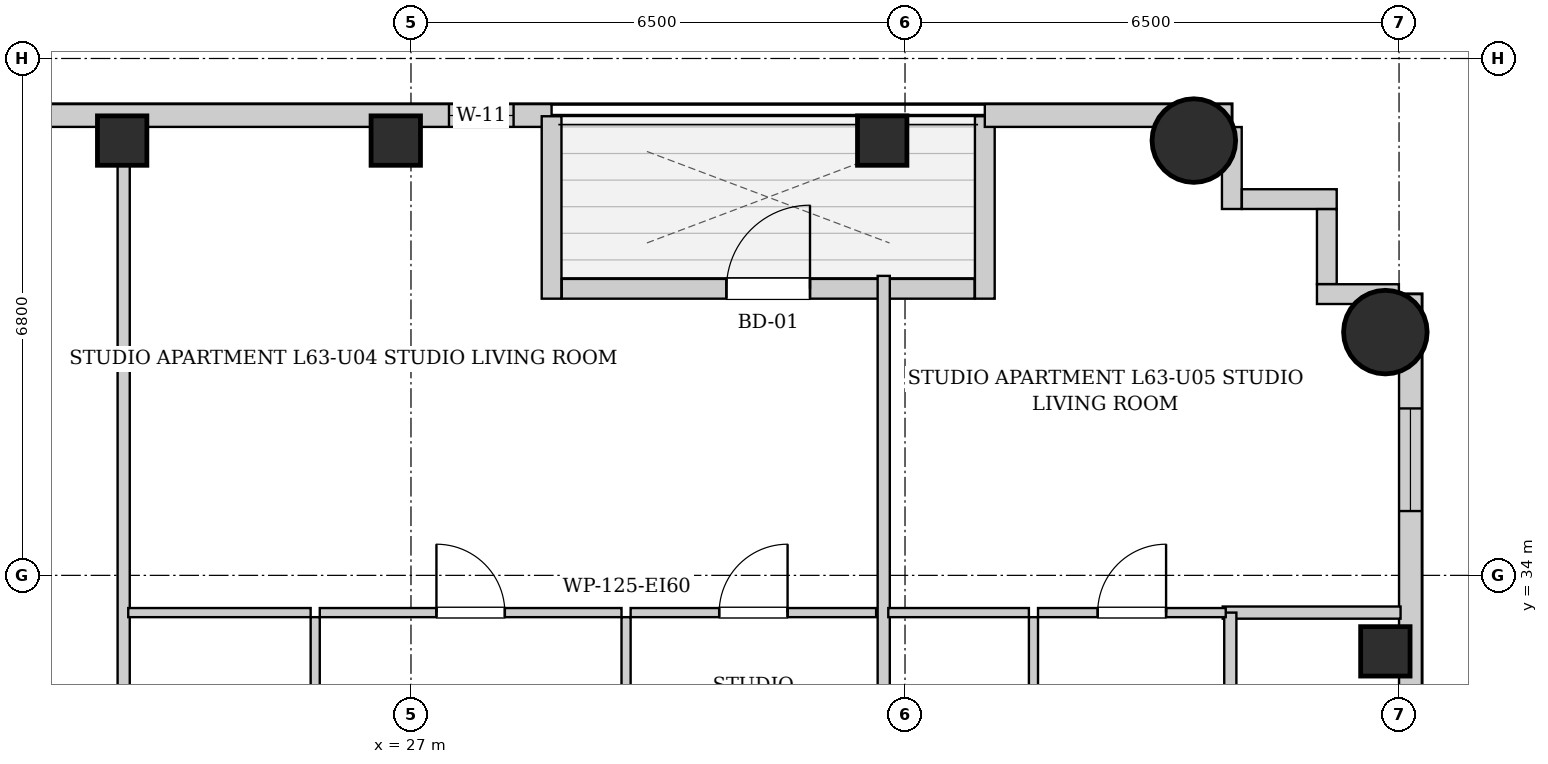
"""IFC4 building model, lengths in metres.
Left out: names, types, materials, properties, quantities, classifications, styles, units other than length and angle.
Written with IfcOpenShell. Run it as: python <this file> out.ifc"""

import sys

from ifc_helpers import new_model, si_unit, direction, frame, frame_2d, origin, origin_2d, place, context, subcontext, project, spatial, rectangle, circle, extrude, element, fill, save


model = new_model("IFC4")
c1 = context("Model", 3, precision=1e-05, world=origin(), true_north=direction((0.0, 1.0)))
c2 = subcontext(c1, "Body", "Model", "MODEL_VIEW")
j1 = project(units=[si_unit("LENGTHUNIT", "METRE"), si_unit("PLANEANGLEUNIT", "RADIAN")], contexts=[c1])
p1 = place(None, origin())
s1 = spatial("IfcSite", under=j1, at=p1, CompositionType="ELEMENT")
p2 = place(p1, origin())
s2 = spatial("IfcBuilding", under=s1, at=p2, CompositionType="ELEMENT")
p3 = place(p2, frame((0.0, 0.0, 217.3)))
s3 = spatial("IfcBuildingStorey", under=s2, at=p3, CompositionType="ELEMENT", Elevation=217.3)
for number, where, z_axis, x_axis in (
    (1, (23.2, 39.72, 0.0), (0.0, 0.0, 1.0), (1.0, 0.0, 0.0)),
    (2, (26.8, 39.72, 0.0), (0.0, 0.0, 1.0), (1.0, 0.0, 0.0)),
    (3, (33.2, 39.72, 0.0), (0.0, 0.0, 1.0), (1.0, 0.0, 0.0)),
):
    element("IfcColumn", number, at=place(p3, frame(where, z_axis=z_axis, x_axis=x_axis)), inside=s3, PredefinedType="COLUMN", context=c2, shape_type="SweptSolid", body=[
        extrude(rectangle(XDim=0.65, YDim=0.65, at=origin_2d()), origin(), (0.0, 0.0, 1.0), 3.4),
    ])
p4 = place(p3, frame((37.3, 39.72, 0.0), z_axis=(0.0, 0.0, 1.0), x_axis=(1.0, 0.0, 0.0)))
e4 = element("IfcColumn", 4, at=p4, inside=s3, PredefinedType="COLUMN", context=c2, shape_type="SweptSolid", body=[
    extrude(circle(Radius=0.55, at=origin_2d()), origin(), (0.0, 0.0, 1.0), 3.4),
])
p5 = place(p3, frame((39.82, 33.0, 0.0), z_axis=(0.0, 0.0, 1.0), x_axis=(1.0, 0.0, 0.0)))
e5 = element("IfcColumn", 5, at=p5, inside=s3, PredefinedType="COLUMN", context=c2, shape_type="SweptSolid", body=[
    extrude(rectangle(XDim=0.65, YDim=0.65, at=origin_2d()), origin(), (0.0, 0.0, 1.0), 3.4),
])
p6 = place(p3, frame((39.82, 37.2, 0.0), z_axis=(0.0, 0.0, 1.0), x_axis=(1.0, 0.0, 0.0)))
e6 = element("IfcColumn", 6, at=p6, inside=s3, PredefinedType="COLUMN", context=c2, shape_type="SweptSolid", body=[
    extrude(circle(Radius=0.55, at=origin_2d()), origin(), (0.0, 0.0, 1.0), 3.4),
])
p7 = place(p3, frame((19.7, 40.05, 0.0), z_axis=(0.0, 0.0, 1.0), x_axis=(1.0, 0.0, 0.0)))
e7 = element("IfcWall", 7, at=p7, inside=s3, PredefinedType="SOLIDWALL", context=c2, shape_type="SweptSolid", body=[
    extrude(rectangle(XDim=9.15, YDim=0.3, at=frame_2d((4.575, 0.0))), origin(), (0.0, 0.0, 1.0), 3.14),
])
p8 = place(p7, frame((7.8, 0.0, 0.55)))
e8 = element("IfcOpeningElement", 8, at=p8, cuts=e7, PredefinedType="OPENING", context=c2, shape_type="SweptSolid", body=[
    extrude(rectangle(XDim=0.85, YDim=1.2, at=frame_2d((0.425, 0.6))), frame((0.0, 0.16, 0.0), z_axis=(0.0, -1.0, 0.0), x_axis=(1.0, 0.0, 0.0)), (0.0, 0.0, 1.0), 0.32),
])
p9 = place(p3, frame((28.85, 40.04, 0.0), z_axis=(0.0, 0.0, 1.0), x_axis=(0.0, -1.0, 0.0)))
e9 = element("IfcWall", 9, at=p9, inside=s3, PredefinedType="SOLIDWALL", context=c2, shape_type="SweptSolid", body=[
    extrude(rectangle(XDim=2.4, YDim=0.26, at=frame_2d((1.2, 0.0))), origin(), (0.0, 0.0, 1.0), 3.14),
])
p10 = place(p3, frame((28.984, 37.77, 0.0), z_axis=(0.0, 0.0, 1.0), x_axis=(1.0, 0.0, 0.0)))
e10 = element("IfcWall", 10, at=p10, inside=s3, PredefinedType="SOLIDWALL", context=c2, shape_type="SweptSolid", body=[
    extrude(rectangle(XDim=5.432, YDim=0.26, at=frame_2d((2.716, 0.0))), origin(), (0.0, 0.0, 1.0), 3.14),
])
p11 = place(p10, frame((2.166, 0.0, 0.0)))
e11 = element("IfcOpeningElement", 11, at=p11, cuts=e10, PredefinedType="OPENING", context=c2, shape_type="SweptSolid", body=[
    extrude(rectangle(XDim=1.1, YDim=2.0, at=frame_2d((0.55, 1.0))), frame((0.0, 0.14, 0.0), z_axis=(0.0, -1.0, 0.0), x_axis=(1.0, 0.0, 0.0)), (0.0, 0.0, 1.0), 0.28),
])
p12 = place(p3, frame((34.55, 37.64, 0.0), z_axis=(0.0, 0.0, 1.0), x_axis=(0.0, 1.0, 0.0)))
e12 = element("IfcWall", 12, at=p12, inside=s3, PredefinedType="SOLIDWALL", context=c2, shape_type="SweptSolid", body=[
    extrude(rectangle(XDim=2.4, YDim=0.26, at=frame_2d((1.2, 0.0))), origin(), (0.0, 0.0, 1.0), 3.14),
])
p13 = place(p3, frame((34.55, 40.05, 0.0), z_axis=(0.0, 0.0, 1.0), x_axis=(1.0, 0.0, 0.0)))
e13 = element("IfcWall", 13, at=p13, inside=s3, PredefinedType="SOLIDWALL", context=c2, shape_type="SweptSolid", body=[
    extrude(rectangle(XDim=3.25, YDim=0.3, at=frame_2d((1.625, 0.0))), origin(), (0.0, 0.0, 1.0), 3.14),
])
p14 = place(p3, frame((40.15, 37.7, 0.0), z_axis=(0.0, 0.0, 1.0), x_axis=(0.0, -1.0, 0.0)))
e14 = element("IfcWall", 14, at=p14, inside=s3, PredefinedType="SOLIDWALL", context=c2, shape_type="SweptSolid", body=[
    extrude(rectangle(XDim=31.4, YDim=0.3, at=frame_2d((15.7, 0.0))), origin(), (0.0, 0.0, 1.0), 3.14),
])
p15 = place(p14, frame((28.546, 0.0, 0.55)))
e15 = element("IfcOpeningElement", 15, at=p15, cuts=e14, PredefinedType="OPENING", context=c2, shape_type="SweptSolid", body=[
    extrude(rectangle(XDim=1.35, YDim=1.2, at=frame_2d((0.675, 0.6))), frame((0.0, 0.16, 0.0), z_axis=(0.0, -1.0, 0.0), x_axis=(1.0, 0.0, 0.0)), (0.0, 0.0, 1.0), 0.32),
])
p16 = place(p14, frame((1.504, 0.0, 0.55)))
e16 = element("IfcOpeningElement", 16, at=p16, cuts=e14, PredefinedType="OPENING", context=c2, shape_type="SweptSolid", body=[
    extrude(rectangle(XDim=1.35, YDim=1.2, at=frame_2d((0.675, 0.6))), frame((0.0, 0.16, 0.0), z_axis=(0.0, -1.0, 0.0), x_axis=(1.0, 0.0, 0.0)), (0.0, 0.0, 1.0), 0.32),
])
p17 = place(p14, frame((18.2, 0.0, 0.55)))
e17 = element("IfcOpeningElement", 17, at=p17, cuts=e14, PredefinedType="OPENING", context=c2, shape_type="SweptSolid", body=[
    extrude(rectangle(XDim=1.35, YDim=1.2, at=frame_2d((0.675, 0.6))), frame((0.0, 0.16, 0.0), z_axis=(0.0, -1.0, 0.0), x_axis=(1.0, 0.0, 0.0)), (0.0, 0.0, 1.0), 0.32),
])
p18 = place(p14, frame((19.81, 0.0, 0.55)))
e18 = element("IfcOpeningElement", 18, at=p18, cuts=e14, PredefinedType="OPENING", context=c2, shape_type="SweptSolid", body=[
    extrude(rectangle(XDim=1.35, YDim=1.2, at=frame_2d((0.675, 0.6))), frame((0.0, 0.16, 0.0), z_axis=(0.0, -1.0, 0.0), x_axis=(1.0, 0.0, 0.0)), (0.0, 0.0, 1.0), 0.32),
])
p19 = place(p14, frame((11.043, 0.0, 0.55)))
e19 = element("IfcOpeningElement", 19, at=p19, cuts=e14, PredefinedType="OPENING", context=c2, shape_type="SweptSolid", body=[
    extrude(rectangle(XDim=1.35, YDim=1.2, at=frame_2d((0.675, 0.6))), frame((0.0, 0.16, 0.0), z_axis=(0.0, -1.0, 0.0), x_axis=(1.0, 0.0, 0.0)), (0.0, 0.0, 1.0), 0.32),
])
p20 = place(p14, frame((9.185, 0.0, 0.55)))
e20 = element("IfcOpeningElement", 20, at=p20, cuts=e14, PredefinedType="OPENING", context=c2, shape_type="SweptSolid", body=[
    extrude(rectangle(XDim=1.35, YDim=1.2, at=frame_2d((0.675, 0.6))), frame((0.0, 0.16, 0.0), z_axis=(0.0, -1.0, 0.0), x_axis=(1.0, 0.0, 0.0)), (0.0, 0.0, 1.0), 0.32),
])
p21 = place(p3, frame((37.8, 39.898, 0.0), z_axis=(0.0, 0.0, 1.0), x_axis=(0.0, -1.0, 0.0)))
e21 = element("IfcWall", 21, at=p21, inside=s3, PredefinedType="SOLIDWALL", context=c2, shape_type="SweptSolid", body=[
    extrude(rectangle(XDim=1.078, YDim=0.26, at=frame_2d((0.539, 0.0))), origin(), (0.0, 0.0, 1.0), 3.14),
])
p22 = place(p3, frame((37.932, 38.95, 0.0), z_axis=(0.0, 0.0, 1.0), x_axis=(1.0, 0.0, 0.0)))
e22 = element("IfcWall", 22, at=p22, inside=s3, PredefinedType="SOLIDWALL", context=c2, shape_type="SweptSolid", body=[
    extrude(rectangle(XDim=1.248, YDim=0.26, at=frame_2d((0.624, 0.0))), origin(), (0.0, 0.0, 1.0), 3.14),
])
p23 = place(p3, frame((39.05, 38.818, 0.0), z_axis=(0.0, 0.0, 1.0), x_axis=(0.0, -1.0, 0.0)))
e23 = element("IfcWall", 23, at=p23, inside=s3, PredefinedType="SOLIDWALL", context=c2, shape_type="SweptSolid", body=[
    extrude(rectangle(XDim=0.986, YDim=0.26, at=frame_2d((0.493, 0.0))), origin(), (0.0, 0.0, 1.0), 3.14),
])
p24 = place(p3, frame((38.92, 37.7, 0.0), z_axis=(0.0, 0.0, 1.0), x_axis=(1.0, 0.0, 0.0)))
e24 = element("IfcWall", 24, at=p24, inside=s3, PredefinedType="SOLIDWALL", context=c2, shape_type="SweptSolid", body=[
    extrude(rectangle(XDim=1.078, YDim=0.26, at=frame_2d((0.539, 0.0))), origin(), (0.0, 0.0, 1.0), 3.14),
])
p25 = place(p3, frame((23.22, 30.6, 0.0), z_axis=(0.0, 0.0, 1.0), x_axis=(0.0, 1.0, 0.0)))
e25 = element("IfcWall", 25, at=p25, inside=s3, PredefinedType="PARTITIONING", context=c2, shape_type="SweptSolid", body=[
    extrude(rectangle(XDim=9.32, YDim=0.16, at=frame_2d((4.66, 0.0))), origin(), (0.0, 0.0, 1.0), 3.14),
])
p26 = place(p3, frame((25.74, 30.6, 0.0), z_axis=(0.0, 0.0, 1.0), x_axis=(0.0, 1.0, 0.0)))
e26 = element("IfcWall", 26, at=p26, inside=s3, PredefinedType="PARTITIONING", context=c2, shape_type="SweptSolid", body=[
    extrude(rectangle(XDim=2.85, YDim=0.12, at=frame_2d((1.425, 0.0))), origin(), (0.0, 0.0, 1.0), 3.14),
])
p27 = place(p26, frame((0.995, 0.0, 0.0)))
e27 = element("IfcOpeningElement", 27, at=p27, cuts=e26, PredefinedType="OPENING", context=c2, shape_type="SweptSolid", body=[
    extrude(rectangle(XDim=0.86, YDim=2.05, at=frame_2d((0.43, 1.025))), frame((0.0, 0.07, 0.0), z_axis=(0.0, -1.0, 0.0), x_axis=(1.0, 0.0, 0.0)), (0.0, 0.0, 1.0), 0.14),
])
p28 = place(p3, frame((23.28, 33.51, 0.0), z_axis=(0.0, 0.0, 1.0), x_axis=(1.0, 0.0, 0.0)))
e28 = element("IfcWall", 28, at=p28, inside=s3, PredefinedType="PARTITIONING", context=c2, shape_type="SweptSolid", body=[
    extrude(rectangle(XDim=2.4, YDim=0.12, at=frame_2d((1.2, 0.0))), origin(), (0.0, 0.0, 1.0), 3.14),
])
p29 = place(p3, frame((29.83, 30.6, 0.0), z_axis=(0.0, 0.0, 1.0), x_axis=(0.0, 1.0, 0.0)))
e29 = element("IfcWall", 29, at=p29, inside=s3, PredefinedType="PARTITIONING", context=c2, shape_type="SweptSolid", body=[
    extrude(rectangle(XDim=2.85, YDim=0.12, at=frame_2d((1.425, 0.0))), origin(), (0.0, 0.0, 1.0), 3.14),
])
p30 = place(p29, frame((0.975, 0.0, 0.0)))
e30 = element("IfcOpeningElement", 30, at=p30, cuts=e29, PredefinedType="OPENING", context=c2, shape_type="SweptSolid", body=[
    extrude(rectangle(XDim=0.9, YDim=2.05, at=frame_2d((0.45, 1.025))), frame((0.0, 0.07, 0.0), z_axis=(0.0, -1.0, 0.0), x_axis=(1.0, 0.0, 0.0)), (0.0, 0.0, 1.0), 0.14),
])
p31 = place(p3, frame((25.8, 33.51, 0.0), z_axis=(0.0, 0.0, 1.0), x_axis=(1.0, 0.0, 0.0)))
e31 = element("IfcWall", 31, at=p31, inside=s3, PredefinedType="PARTITIONING", context=c2, shape_type="SweptSolid", body=[
    extrude(rectangle(XDim=3.97, YDim=0.12, at=frame_2d((1.985, 0.0))), origin(), (0.0, 0.0, 1.0), 3.14),
])
p32 = place(p31, frame((1.535, 0.0, 0.0)))
e32 = element("IfcOpeningElement", 32, at=p32, cuts=e31, PredefinedType="OPENING", context=c2, shape_type="SweptSolid", body=[
    extrude(rectangle(XDim=0.9, YDim=2.05, at=frame_2d((0.45, 1.025))), frame((0.0, 0.07, 0.0), z_axis=(0.0, -1.0, 0.0), x_axis=(1.0, 0.0, 0.0)), (0.0, 0.0, 1.0), 0.14),
])
p33 = place(p3, frame((29.89, 33.51, 0.0), z_axis=(0.0, 0.0, 1.0), x_axis=(1.0, 0.0, 0.0)))
e33 = element("IfcWall", 33, at=p33, inside=s3, PredefinedType="PARTITIONING", context=c2, shape_type="SweptSolid", body=[
    extrude(rectangle(XDim=3.23, YDim=0.12, at=frame_2d((1.615, 0.0))), origin(), (0.0, 0.0, 1.0), 3.14),
])
p34 = place(p33, frame((1.165, 0.0, 0.0)))
e34 = element("IfcOpeningElement", 34, at=p34, cuts=e33, PredefinedType="OPENING", context=c2, shape_type="SweptSolid", body=[
    extrude(rectangle(XDim=0.9, YDim=2.05, at=frame_2d((0.45, 1.025))), frame((0.0, 0.07, 0.0), z_axis=(0.0, -1.0, 0.0), x_axis=(1.0, 0.0, 0.0)), (0.0, 0.0, 1.0), 0.14),
])
p35 = place(p3, frame((37.68, 33.51, 0.0), z_axis=(0.0, 0.0, 1.0), x_axis=(1.0, 0.0, 0.0)))
e35 = element("IfcWall", 35, at=p35, inside=s3, PredefinedType="PARTITIONING", context=c2, shape_type="SweptSolid", body=[
    extrude(rectangle(XDim=2.34, YDim=0.16, at=frame_2d((1.17, 0.0))), origin(), (0.0, 0.0, 1.0), 3.14),
])
p36 = place(p3, frame((37.78, 30.6, 0.0), z_axis=(0.0, 0.0, 1.0), x_axis=(0.0, 1.0, 0.0)))
e36 = element("IfcWall", 36, at=p36, inside=s3, PredefinedType="PARTITIONING", context=c2, shape_type="SweptSolid", body=[
    extrude(rectangle(XDim=2.91, YDim=0.16, at=frame_2d((1.455, 0.0))), origin(), (0.0, 0.0, 1.0), 3.14),
])
p37 = place(p3, frame((33.22, 30.6, 0.0), z_axis=(0.0, 0.0, 1.0), x_axis=(0.0, 1.0, 0.0)))
e37 = element("IfcWall", 37, at=p37, inside=s3, PredefinedType="PARTITIONING", context=c2, shape_type="SweptSolid", body=[
    extrude(rectangle(XDim=7.34, YDim=0.16, at=frame_2d((3.67, 0.0))), origin(), (0.0, 0.0, 1.0), 2.668),
])
p38 = place(p3, frame((35.19, 30.6, 0.0), z_axis=(0.0, 0.0, 1.0), x_axis=(0.0, 1.0, 0.0)))
e38 = element("IfcWall", 38, at=p38, inside=s3, PredefinedType="PARTITIONING", context=c2, shape_type="SweptSolid", body=[
    extrude(rectangle(XDim=2.85, YDim=0.12, at=frame_2d((1.425, 0.0))), origin(), (0.0, 0.0, 1.0), 3.14),
])
p39 = place(p38, frame((0.995, 0.0, 0.0)))
e39 = element("IfcOpeningElement", 39, at=p39, cuts=e38, PredefinedType="OPENING", context=c2, shape_type="SweptSolid", body=[
    extrude(rectangle(XDim=0.86, YDim=2.05, at=frame_2d((0.43, 1.025))), frame((0.0, 0.07, 0.0), z_axis=(0.0, -1.0, 0.0), x_axis=(1.0, 0.0, 0.0)), (0.0, 0.0, 1.0), 0.14),
])
p40 = place(p3, frame((33.28, 33.51, 0.0), z_axis=(0.0, 0.0, 1.0), x_axis=(1.0, 0.0, 0.0)))
e40 = element("IfcWall", 40, at=p40, inside=s3, PredefinedType="PARTITIONING", context=c2, shape_type="SweptSolid", body=[
    extrude(rectangle(XDim=1.85, YDim=0.12, at=frame_2d((0.925, 0.0))), origin(), (0.0, 0.0, 1.0), 3.14),
])
p41 = place(p3, frame((35.25, 33.51, 0.0), z_axis=(0.0, 0.0, 1.0), x_axis=(1.0, 0.0, 0.0)))
e41 = element("IfcWall", 41, at=p41, inside=s3, PredefinedType="PARTITIONING", context=c2, shape_type="SweptSolid", body=[
    extrude(rectangle(XDim=2.47, YDim=0.12, at=frame_2d((1.235, 0.0))), origin(), (0.0, 0.0, 1.0), 3.14),
])
p42 = place(p41, frame((0.785, 0.0, 0.0)))
e42 = element("IfcOpeningElement", 42, at=p42, cuts=e41, PredefinedType="OPENING", context=c2, shape_type="SweptSolid", body=[
    extrude(rectangle(XDim=0.9, YDim=2.05, at=frame_2d((0.45, 1.025))), frame((0.0, 0.07, 0.0), z_axis=(0.0, -1.0, 0.0), x_axis=(1.0, 0.0, 0.0)), (0.0, 0.0, 1.0), 0.14),
])
p43 = place(p32, origin())
e43 = element("IfcDoor", 43, at=p43, inside=s3, OperationType="SINGLE_SWING_LEFT", PredefinedType="DOOR", context=c2, shape_type="SweptSolid", body=[
    extrude(rectangle(XDim=0.9, YDim=2.05, at=frame_2d((0.45, 1.025))), frame((0.0, 0.025, 0.0), z_axis=(0.0, -1.0, 0.0), x_axis=(1.0, 0.0, 0.0)), (0.0, 0.0, 1.0), 0.05),
])
fill(e32, e43)
p44 = place(p34, origin())
e44 = element("IfcDoor", 44, at=p44, inside=s3, OperationType="SINGLE_SWING_RIGHT", PredefinedType="DOOR", context=c2, shape_type="SweptSolid", body=[
    extrude(rectangle(XDim=0.9, YDim=2.05, at=frame_2d((0.45, 1.025))), frame((0.0, 0.025, 0.0), z_axis=(0.0, -1.0, 0.0), x_axis=(1.0, 0.0, 0.0)), (0.0, 0.0, 1.0), 0.05),
])
fill(e34, e44)
p45 = place(p42, origin())
e45 = element("IfcDoor", 45, at=p45, inside=s3, OperationType="SINGLE_SWING_RIGHT", PredefinedType="DOOR", context=c2, shape_type="SweptSolid", body=[
    extrude(rectangle(XDim=0.9, YDim=2.05, at=frame_2d((0.45, 1.025))), frame((0.0, 0.025, 0.0), z_axis=(0.0, -1.0, 0.0), x_axis=(1.0, 0.0, 0.0)), (0.0, 0.0, 1.0), 0.05),
])
fill(e42, e45)
p46 = place(p11, origin())
e46 = element("IfcDoor", 46, at=p46, inside=s3, OperationType="SINGLE_SWING_RIGHT", PredefinedType="DOOR", context=c2, shape_type="SweptSolid", body=[
    extrude(rectangle(XDim=1.1, YDim=2.0, at=frame_2d((0.55, 1.0))), frame((0.0, 0.025, 0.0), z_axis=(0.0, -1.0, 0.0), x_axis=(1.0, 0.0, 0.0)), (0.0, 0.0, 1.0), 0.05),
])
fill(e11, e46)
p47 = place(p8, origin())
e47 = element("IfcWindow", 47, at=p47, inside=s3, PartitioningType="SINGLE_PANEL", PredefinedType="WINDOW", context=c2, shape_type="SweptSolid", body=[
    extrude(rectangle(XDim=0.85, YDim=1.2, at=frame_2d((0.425, 0.6))), frame((0.0, 0.03, 0.0), z_axis=(0.0, -1.0, 0.0), x_axis=(1.0, 0.0, 0.0)), (0.0, 0.0, 1.0), 0.06),
])
fill(e8, e47)
p48 = place(p16, origin())
e48 = element("IfcWindow", 48, at=p48, inside=s3, PartitioningType="SINGLE_PANEL", PredefinedType="WINDOW", context=c2, shape_type="SweptSolid", body=[
    extrude(rectangle(XDim=1.35, YDim=1.2, at=frame_2d((0.675, 0.6))), frame((0.0, 0.03, 0.0), z_axis=(0.0, -1.0, 0.0), x_axis=(1.0, 0.0, 0.0)), (0.0, 0.0, 1.0), 0.06),
])
fill(e16, e48)
save(model, sys.argv[1])
